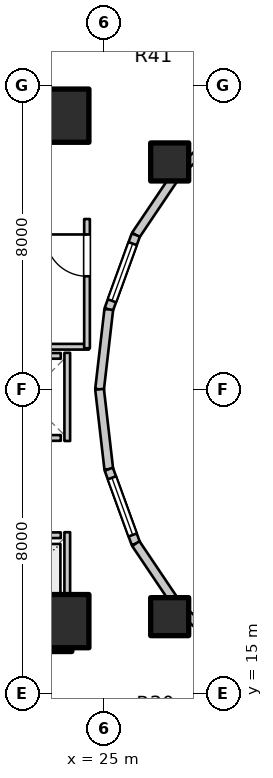
"""IFC4 building model, lengths in metres.
Left out: names, types, materials, properties, quantities, classifications, styles, units other than length and angle.
Written with IfcOpenShell. Run it as: python <this file> out.ifc"""

import sys

from ifc_helpers import new_model, si_unit, direction, frame, frame_2d, origin, origin_2d, place, context, subcontext, project, spatial, rectangle, extrude, element, fill, save


model = new_model("IFC4")
c1 = context("Model", 3, precision=1e-05, world=origin(), true_north=direction((0.0, 1.0)))
c2 = subcontext(c1, "Body", "Model", "MODEL_VIEW")
j1 = project(units=[si_unit("LENGTHUNIT", "METRE"), si_unit("PLANEANGLEUNIT", "RADIAN")], contexts=[c1])
p1 = place(None, origin())
s1 = spatial("IfcSite", under=j1, at=p1, CompositionType="ELEMENT")
p2 = place(p1, origin())
s2 = spatial("IfcBuilding", under=s1, at=p2, CompositionType="ELEMENT")
p3 = place(p2, frame((0.0, 0.0, 27.6)))
s3 = spatial("IfcBuildingStorey", under=s2, at=p3, CompositionType="ELEMENT", Elevation=27.6)
for number, where, z_axis, x_axis in (
    (1, (19.65, 16.55, 0.0), (0.0, 0.0, 1.0), (1.0, 0.0, 0.0)),
    (2, (19.65, 30.35, 0.0), (0.0, 0.0, 1.0), (1.0, 0.0, 0.0)),
):
    element("IfcWall", number, at=place(p3, frame(where, z_axis=z_axis, x_axis=x_axis)), inside=s3, PredefinedType="SHEAR", context=c2, shape_type="SweptSolid", body=[
        extrude(rectangle(XDim=4.5, YDim=0.9, at=frame_2d((2.25, 0.0))), origin(), (0.0, 0.0, 1.0), 3.1),
    ])
for number, where, z_axis, x_axis in (
    (3, (23.9, 16.9, 0.0), (0.0, 0.0, 1.0), (1.0, 0.0, 0.0)),
    (4, (23.9, 30.2, 0.0), (0.0, 0.0, 1.0), (1.0, 0.0, 0.0)),
):
    element("IfcColumn", number, at=place(p3, frame(where, z_axis=z_axis, x_axis=x_axis)), inside=s3, PredefinedType="COLUMN", context=c2, shape_type="SweptSolid", body=[
        extrude(rectangle(XDim=1.4, YDim=1.4, at=origin_2d()), origin(), (0.0, 0.0, 1.0), 3.1),
    ])
for number, where, z_axis, x_axis in (
    (5, (26.725, 28.982, 0.0), (0.0, 0.0, 1.0), (1.0, 0.0, 0.0)),
    (6, (26.725, 17.018, 0.0), (0.0, 0.0, 1.0), (1.0, 0.0, 0.0)),
):
    element("IfcColumn", number, at=place(p3, frame(where, z_axis=z_axis, x_axis=x_axis)), inside=s3, PredefinedType="COLUMN", context=c2, shape_type="SweptSolid", body=[
        extrude(rectangle(XDim=1.0, YDim=1.0, at=origin_2d()), origin(), (0.0, 0.0, 1.0), 3.1),
    ])
p4 = place(p3, frame((28.44, 30.032, 0.0), z_axis=(0.0, 0.0, 1.0), x_axis=(-0.752576694707, -0.658504607869, 0.0)))
e7 = element("IfcWall", 7, at=p4, inside=s3, PredefinedType="STANDARD", context=c2, shape_type="SweptSolid", body=[
    extrude(rectangle(XDim=1.959, YDim=0.23, at=frame_2d((0.98, 0.0))), origin(), (0.0, 0.0, 1.0), 2.16),
])
p5 = place(p3, frame((26.965, 28.742, 0.0), z_axis=(0.0, 0.0, 1.0), x_axis=(-0.558197800898, -0.829707909492, 0.0)))
e8 = element("IfcWall", 8, at=p5, inside=s3, PredefinedType="STANDARD", context=c2, shape_type="SweptSolid", body=[
    extrude(rectangle(XDim=2.027, YDim=0.23, at=frame_2d((1.013, 0.0))), origin(), (0.0, 0.0, 1.0), 2.16),
])
p6 = place(p3, frame((25.834, 27.06, 0.0), z_axis=(0.0, 0.0, 1.0), x_axis=(-0.341423187295, -0.93990968033, 0.0)))
e9 = element("IfcWall", 9, at=p6, inside=s3, PredefinedType="STANDARD", context=c2, shape_type="SweptSolid", body=[
    extrude(rectangle(XDim=2.084, YDim=0.23, at=frame_2d((1.042, 0.0))), origin(), (0.0, 0.0, 1.0), 2.84),
])
p7 = place(p6, frame((0.242, 0.0, 0.85)))
e10 = element("IfcOpeningElement", 10, at=p7, cuts=e9, PredefinedType="OPENING", context=c2, shape_type="SweptSolid", body=[
    extrude(rectangle(XDim=1.6, YDim=1.65, at=frame_2d((0.8, 0.825))), frame((0.0, 0.125, 0.0), z_axis=(0.0, -1.0, 0.0), x_axis=(1.0, 0.0, 0.0)), (0.0, 0.0, 1.0), 0.25),
])
for number, where, z_axis, x_axis in (
    (11, (25.123, 25.102, 0.0), (0.0, 0.0, 1.0), (-0.115, -0.993, 0.0)),
    (12, (24.88, 23.0, 0.0), (0.0, 0.0, 1.0), (0.115, -0.993, 0.0)),
):
    element("IfcWall", number, at=place(p3, frame(where, z_axis=z_axis, x_axis=x_axis)), inside=s3, PredefinedType="STANDARD", context=c2, shape_type="SweptSolid", body=[
        extrude(rectangle(XDim=2.115, YDim=0.23, at=frame_2d((1.058, 0.0))), origin(), (0.0, 0.0, 1.0), 2.84),
    ])
p8 = place(p3, frame((25.123, 20.898, 0.0), z_axis=(0.0, 0.0, 1.0), x_axis=(0.341423187295, -0.93990968033, 0.0)))
e13 = element("IfcWall", 13, at=p8, inside=s3, PredefinedType="STANDARD", context=c2, shape_type="SweptSolid", body=[
    extrude(rectangle(XDim=2.084, YDim=0.23, at=frame_2d((1.042, 0.0))), origin(), (0.0, 0.0, 1.0), 2.84),
])
p9 = place(p8, frame((0.242, 0.0, 0.85)))
e14 = element("IfcOpeningElement", 14, at=p9, cuts=e13, PredefinedType="OPENING", context=c2, shape_type="SweptSolid", body=[
    extrude(rectangle(XDim=1.6, YDim=1.65, at=frame_2d((0.8, 0.825))), frame((0.0, 0.125, 0.0), z_axis=(0.0, -1.0, 0.0), x_axis=(1.0, 0.0, 0.0)), (0.0, 0.0, 1.0), 0.25),
])
p10 = place(p3, frame((25.834, 18.94, 0.0), z_axis=(0.0, 0.0, 1.0), x_axis=(0.558197800898, -0.829707909492, 0.0)))
e15 = element("IfcWall", 15, at=p10, inside=s3, PredefinedType="STANDARD", context=c2, shape_type="SweptSolid", body=[
    extrude(rectangle(XDim=2.027, YDim=0.23, at=frame_2d((1.013, 0.0))), origin(), (0.0, 0.0, 1.0), 2.16),
])
p11 = place(p3, frame((26.965, 17.258, 0.0), z_axis=(0.0, 0.0, 1.0), x_axis=(0.752576694707, -0.658504607869, 0.0)))
e16 = element("IfcWall", 16, at=p11, inside=s3, PredefinedType="STANDARD", context=c2, shape_type="SweptSolid", body=[
    extrude(rectangle(XDim=1.959, YDim=0.23, at=frame_2d((0.98, 0.0))), origin(), (0.0, 0.0, 1.0), 2.16),
])
p12 = place(p3, frame((22.04, 19.16, 0.0), z_axis=(0.0, 0.0, 1.0), x_axis=(1.0, 0.0, 0.0)))
e17 = element("IfcWall", 17, at=p12, inside=s3, PredefinedType="SOLIDWALL", context=c2, shape_type="SweptSolid", body=[
    extrude(rectangle(XDim=1.82, YDim=0.15, at=frame_2d((0.91, 0.0))), origin(), (0.0, 0.0, 1.0), 2.12),
])
p13 = place(p12, frame((0.36, 0.0, 0.0)))
e18 = element("IfcOpeningElement", 18, at=p13, cuts=e17, PredefinedType="OPENING", context=c2, shape_type="SweptSolid", body=[
    extrude(rectangle(XDim=1.1, YDim=2.1, at=frame_2d((0.55, 1.05))), frame((0.0, 0.085, 0.0), z_axis=(0.0, -1.0, 0.0), x_axis=(1.0, 0.0, 0.0)), (0.0, 0.0, 1.0), 0.17),
])
p14 = place(p3, frame((22.04, 17.1, 0.0), z_axis=(0.0, 0.0, 1.0), x_axis=(1.0, 0.0, 0.0)))
e19 = element("IfcWall", 19, at=p14, inside=s3, PredefinedType="SOLIDWALL", context=c2, shape_type="SweptSolid", body=[
    extrude(rectangle(XDim=1.82, YDim=0.15, at=frame_2d((0.91, 0.0))), origin(), (0.0, 0.0, 1.0), 2.12),
])
p15 = place(p3, frame((24.03, 17.02, 0.0), z_axis=(0.0, 0.0, 1.0), x_axis=(0.0, 1.0, 0.0)))
e20 = element("IfcWall", 20, at=p15, inside=s3, PredefinedType="SOLIDWALL", context=c2, shape_type="SweptSolid", body=[
    extrude(rectangle(XDim=2.22, YDim=0.15, at=frame_2d((1.11, 0.0))), origin(), (0.0, 0.0, 1.0), 2.12),
])
for number, where, z_axis, x_axis in (
    (21, (22.04, 21.72, 0.0), (0.0, 0.0, 1.0), (1.0, 0.0, 0.0)),
    (22, (22.04, 23.88, 0.0), (0.0, 0.0, 1.0), (1.0, 0.0, 0.0)),
):
    element("IfcWall", number, at=place(p3, frame(where, z_axis=z_axis, x_axis=x_axis)), inside=s3, PredefinedType="SOLIDWALL", context=c2, shape_type="SweptSolid", body=[
        extrude(rectangle(XDim=1.82, YDim=0.15, at=frame_2d((0.91, 0.0))), origin(), (0.0, 0.0, 1.0), 2.12),
    ])
p16 = place(p3, frame((24.03, 21.64, 0.0), z_axis=(0.0, 0.0, 1.0), x_axis=(0.0, 1.0, 0.0)))
e23 = element("IfcWall", 23, at=p16, inside=s3, PredefinedType="SOLIDWALL", context=c2, shape_type="SweptSolid", body=[
    extrude(rectangle(XDim=2.32, YDim=0.15, at=frame_2d((1.16, 0.0))), origin(), (0.0, 0.0, 1.0), 2.12),
])
p17 = place(p3, frame((19.52, 24.12, 0.0), z_axis=(0.0, 0.0, 1.0), x_axis=(1.0, 0.0, 0.0)))
e24 = element("IfcWall", 24, at=p17, inside=s3, PredefinedType="PARTITIONING", context=c2, shape_type="SweptSolid", body=[
    extrude(rectangle(XDim=5.08, YDim=0.15, at=frame_2d((2.54, 0.0))), origin(), (0.0, 0.0, 1.0), 2.12),
])
p18 = place(p3, frame((24.55, 24.08, 0.0), z_axis=(0.0, 0.0, 1.0), x_axis=(0.0, 1.0, 0.0)))
e25 = element("IfcWall", 25, at=p18, inside=s3, PredefinedType="PARTITIONING", context=c2, shape_type="SweptSolid", body=[
    extrude(rectangle(XDim=3.4, YDim=0.15, at=frame_2d((1.7, 0.0))), origin(), (0.0, 0.0, 1.0), 2.855),
])
p19 = place(p18, frame((1.894, 0.0, 0.0)))
e26 = element("IfcOpeningElement", 26, at=p19, cuts=e25, PredefinedType="OPENING", context=c2, shape_type="SweptSolid", body=[
    extrude(rectangle(XDim=1.1, YDim=2.1, at=frame_2d((0.55, 1.05))), frame((0.0, 0.085, 0.0), z_axis=(0.0, -1.0, 0.0), x_axis=(1.0, 0.0, 0.0)), (0.0, 0.0, 1.0), 0.17),
])
p20 = place(p7, origin())
e27 = element("IfcWindow", 27, at=p20, inside=s3, PartitioningType="SINGLE_PANEL", PredefinedType="WINDOW", context=c2, shape_type="SweptSolid", body=[
    extrude(rectangle(XDim=1.6, YDim=1.65, at=frame_2d((0.8, 0.825))), frame((0.0, 0.03, 0.0), z_axis=(0.0, -1.0, 0.0), x_axis=(1.0, 0.0, 0.0)), (0.0, 0.0, 1.0), 0.06),
])
fill(e10, e27)
p21 = place(p9, origin())
e28 = element("IfcWindow", 28, at=p21, inside=s3, PartitioningType="SINGLE_PANEL", PredefinedType="WINDOW", context=c2, shape_type="SweptSolid", body=[
    extrude(rectangle(XDim=1.6, YDim=1.65, at=frame_2d((0.8, 0.825))), frame((0.0, 0.03, 0.0), z_axis=(0.0, -1.0, 0.0), x_axis=(1.0, 0.0, 0.0)), (0.0, 0.0, 1.0), 0.06),
])
fill(e14, e28)
p22 = place(p19, origin())
e29 = element("IfcDoor", 29, at=p22, inside=s3, OperationType="SINGLE_SWING_RIGHT", PredefinedType="DOOR", context=c2, shape_type="SweptSolid", body=[
    extrude(rectangle(XDim=1.1, YDim=2.1, at=frame_2d((0.55, 1.05))), frame((0.0, 0.025, 0.0), z_axis=(0.0, -1.0, 0.0), x_axis=(1.0, 0.0, 0.0)), (0.0, 0.0, 1.0), 0.05),
])
fill(e26, e29)
save(model, sys.argv[1])
